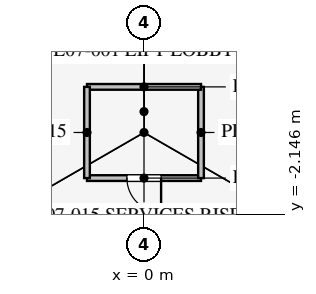
"""IFC4 building model, lengths in metres.
Left out: names, types, materials, properties, quantities, classifications, styles, units other than length and angle.
Written with IfcOpenShell. Run it as: python <this file> out.ifc"""

import sys

from ifc_helpers import new_model, si_unit, direction, frame, frame_2d, origin, place, context, subcontext, project, spatial, rectangle, extrude, element, fill, save


model = new_model("IFC4")
c1 = context("Model", 3, precision=1e-05, world=origin(), true_north=direction((0.0, 1.0)))
c2 = subcontext(c1, "Body", "Model", "MODEL_VIEW")
j1 = project(units=[si_unit("LENGTHUNIT", "METRE"), si_unit("PLANEANGLEUNIT", "RADIAN")], contexts=[c1])
p1 = place(None, origin())
s1 = spatial("IfcSite", under=j1, at=p1, CompositionType="ELEMENT")
p2 = place(p1, origin())
s2 = spatial("IfcBuilding", under=s1, at=p2, CompositionType="ELEMENT")
p3 = place(p2, frame((0.0, 0.0, 33.3)))
s3 = spatial("IfcBuildingStorey", under=s2, at=p3, CompositionType="ELEMENT", Elevation=33.3)
p4 = place(p3, frame((-1.5, -1.2, 0.0), z_axis=(0.0, 0.0, 1.0), x_axis=(1.0, 0.0, 0.0)))
e1 = element("IfcWall", 1, at=p4, inside=s3, PredefinedType="PARTITIONING", context=c2, shape_type="SweptSolid", body=[
    extrude(rectangle(XDim=3.0, YDim=0.15, at=frame_2d((1.5, 0.0))), origin(), (0.0, 0.0, 1.0), 4.0),
])
p5 = place(p4, frame((1.05, 0.0, 0.0)))
e2 = element("IfcOpeningElement", 2, at=p5, cuts=e1, PredefinedType="OPENING", context=c2, shape_type="SweptSolid", body=[
    extrude(rectangle(XDim=0.9, YDim=2.1, at=frame_2d((0.45, 1.05))), frame((0.0, 0.085, 0.0), z_axis=(0.0, -1.0, 0.0), x_axis=(1.0, 0.0, 0.0)), (0.0, 0.0, 1.0), 0.17),
])
p6 = place(p3, frame((1.5, -1.2, 0.0), z_axis=(0.0, 0.0, 1.0), x_axis=(0.0, 1.0, 0.0)))
e3 = element("IfcWall", 3, at=p6, inside=s3, PredefinedType="PARTITIONING", context=c2, shape_type="SweptSolid", body=[
    extrude(rectangle(XDim=2.4, YDim=0.15, at=frame_2d((1.2, 0.0))), origin(), (0.0, 0.0, 1.0), 4.0),
])
p7 = place(p3, frame((1.5, 1.2, 0.0), z_axis=(0.0, 0.0, 1.0), x_axis=(-1.0, 0.0, 0.0)))
e4 = element("IfcWall", 4, at=p7, inside=s3, PredefinedType="PARTITIONING", context=c2, shape_type="SweptSolid", body=[
    extrude(rectangle(XDim=3.0, YDim=0.15, at=frame_2d((1.5, 0.0))), origin(), (0.0, 0.0, 1.0), 4.0),
])
p8 = place(p3, frame((-1.5, 1.2, 0.0), z_axis=(0.0, 0.0, 1.0), x_axis=(0.0, -1.0, 0.0)))
e5 = element("IfcWall", 5, at=p8, inside=s3, PredefinedType="PARTITIONING", context=c2, shape_type="SweptSolid", body=[
    extrude(rectangle(XDim=2.4, YDim=0.15, at=frame_2d((1.2, 0.0))), origin(), (0.0, 0.0, 1.0), 4.0),
])
p9 = place(p5, frame((0.9, 0.0, 0.0), z_axis=(0.0, 0.0, 1.0), x_axis=(-1.0, 0.0, 0.0)))
e6 = element("IfcDoor", 6, at=p9, inside=s3, OperationType="SINGLE_SWING_LEFT", PredefinedType="DOOR", context=c2, shape_type="SweptSolid", body=[
    extrude(rectangle(XDim=0.9, YDim=2.1, at=frame_2d((0.45, 1.05))), frame((0.0, 0.025, 0.0), z_axis=(0.0, -1.0, 0.0), x_axis=(1.0, 0.0, 0.0)), (0.0, 0.0, 1.0), 0.05),
])
fill(e2, e6)
save(model, sys.argv[1])
